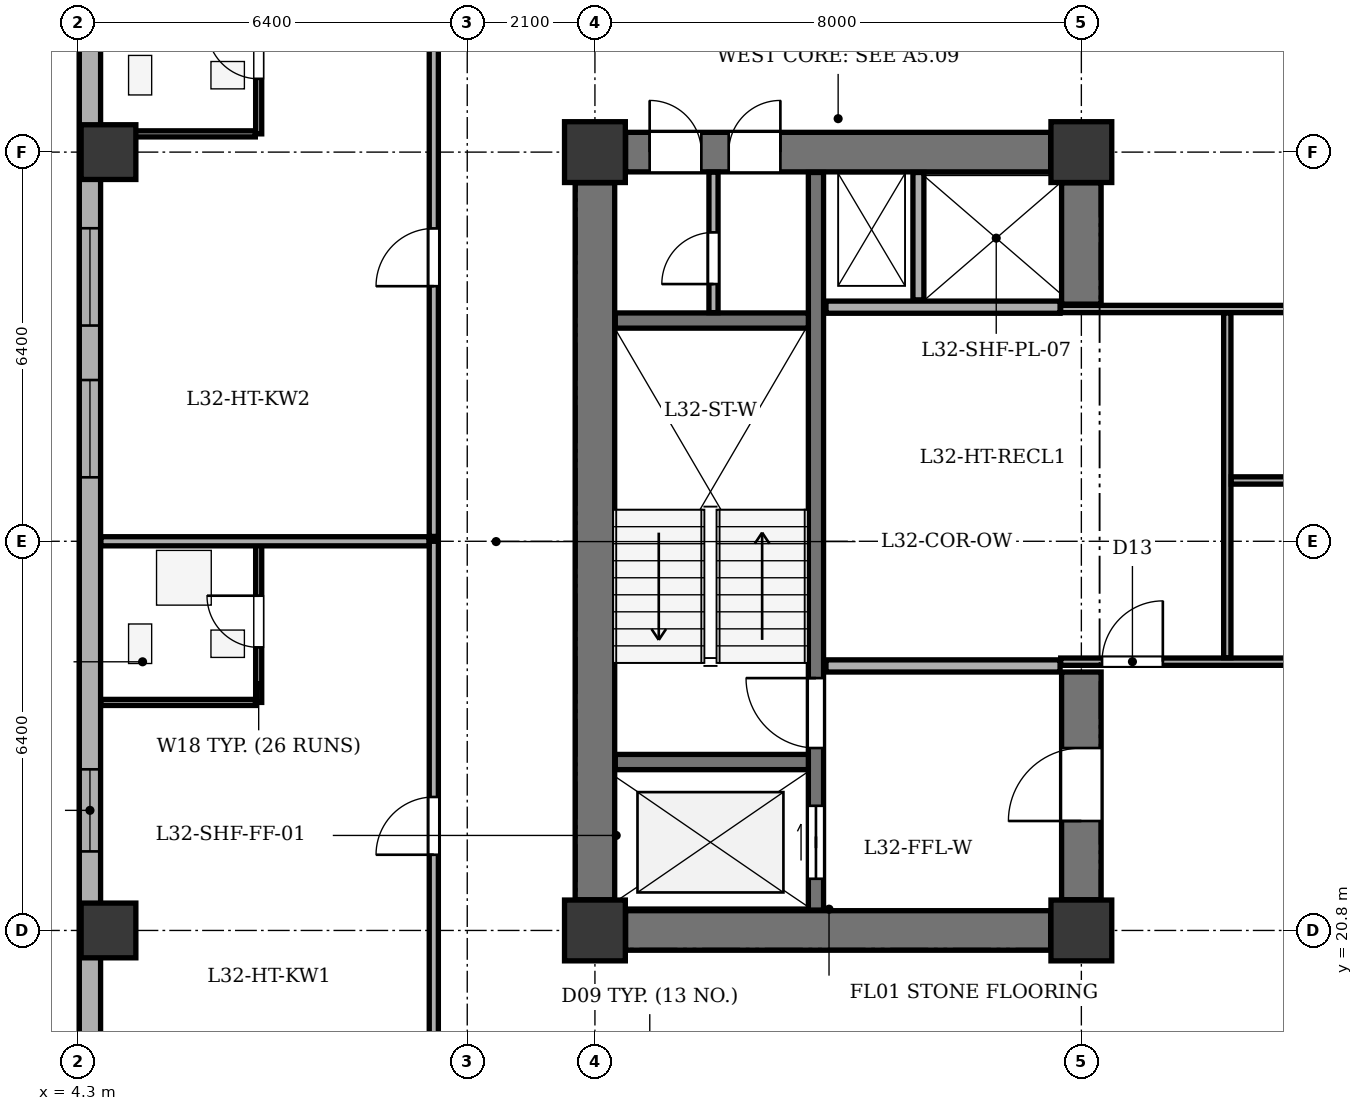
"""IFC4 building model, lengths in metres.
Left out: names, types, materials, properties, quantities, classifications, styles, units other than length and angle.
Written with IfcOpenShell. Run it as: python <this file> out.ifc"""

import sys

from ifc_helpers import new_model, si_unit, direction, frame, frame_2d, origin, origin_2d, place, context, subcontext, project, spatial, rectangle, extrude, element, fill, save


model = new_model("IFC4")
c1 = context("Model", 3, precision=1e-05, world=origin(), true_north=direction((0.0, 1.0)))
c2 = subcontext(c1, "Body", "Model", "MODEL_VIEW")
j1 = project(units=[si_unit("LENGTHUNIT", "METRE"), si_unit("PLANEANGLEUNIT", "RADIAN")], contexts=[c1])
p1 = place(None, origin())
s1 = spatial("IfcSite", under=j1, at=p1, CompositionType="ELEMENT")
p2 = place(p1, origin())
s2 = spatial("IfcBuilding", under=s1, at=p2, CompositionType="ELEMENT")
p3 = place(p2, frame((0.0, 0.0, 130.8)))
s3 = spatial("IfcBuildingStorey", under=s2, at=p3, CompositionType="ELEMENT", Elevation=130.8)
for number, where, z_axis, x_axis in (
    (1, (12.8, 20.8, 0.0), (0.0, 0.0, 1.0), (1.0, 0.0, 0.0)),
    (2, (20.8, 20.8, 0.0), (0.0, 0.0, 1.0), (1.0, 0.0, 0.0)),
    (3, (12.8, 33.6, 0.0), (0.0, 0.0, 1.0), (1.0, 0.0, 0.0)),
    (4, (20.8, 33.6, 0.0), (0.0, 0.0, 1.0), (1.0, 0.0, 0.0)),
):
    element("IfcColumn", number, at=place(p3, frame(where, z_axis=z_axis, x_axis=x_axis)), inside=s3, PredefinedType="COLUMN", context=c2, shape_type="SweptSolid", body=[
        extrude(rectangle(XDim=1.0, YDim=1.0, at=origin_2d()), origin(), (0.0, 0.0, 1.0), 3.5),
    ])
for number, where, z_axis, x_axis in (
    (5, (4.8, 20.8, 0.0), (0.0, 0.0, 1.0), (1.0, 0.0, 0.0)),
    (6, (4.8, 33.6, 0.0), (0.0, 0.0, 1.0), (1.0, 0.0, 0.0)),
):
    element("IfcColumn", number, at=place(p3, frame(where, z_axis=z_axis, x_axis=x_axis)), inside=s3, PredefinedType="COLUMN", context=c2, shape_type="SweptSolid", body=[
        extrude(rectangle(XDim=0.9, YDim=0.9, at=origin_2d()), origin(), (0.0, 0.0, 1.0), 3.5),
    ])
p4 = place(p3, frame((4.495, 6.5, 0.0), z_axis=(0.0, 0.0, 1.0), x_axis=(0.0, 1.0, 0.0)))
e7 = element("IfcWall", 7, at=p4, inside=s3, PredefinedType="STANDARD", context=c2, shape_type="SweptSolid", body=[
    extrude(rectangle(XDim=35.0, YDim=0.35, at=frame_2d((17.5, 0.0))), origin(), (0.0, 0.0, 1.0), 2.785),
])
p5 = place(p4, frame((2.595, 0.0, 0.75)))
e8 = element("IfcOpeningElement", 8, at=p5, cuts=e7, PredefinedType="OPENING", context=c2, shape_type="SweptSolid", body=[
    extrude(rectangle(XDim=1.6, YDim=1.75, at=frame_2d((0.8, 0.875))), frame((0.0, 0.185, 0.0), z_axis=(0.0, -1.0, 0.0), x_axis=(1.0, 0.0, 0.0)), (0.0, 0.0, 1.0), 0.37),
])
p6 = place(p4, frame((7.181, 0.0, 0.75)))
e9 = element("IfcOpeningElement", 9, at=p6, cuts=e7, PredefinedType="OPENING", context=c2, shape_type="SweptSolid", body=[
    extrude(rectangle(XDim=2.1, YDim=1.75, at=frame_2d((1.05, 0.875))), frame((0.0, 0.185, 0.0), z_axis=(0.0, -1.0, 0.0), x_axis=(1.0, 0.0, 0.0)), (0.0, 0.0, 1.0), 0.37),
])
p7 = place(p4, frame((15.6, 0.0, 0.75)))
e10 = element("IfcOpeningElement", 10, at=p7, cuts=e7, PredefinedType="OPENING", context=c2, shape_type="SweptSolid", body=[
    extrude(rectangle(XDim=1.35, YDim=1.75, at=frame_2d((0.675, 0.875))), frame((0.0, 0.185, 0.0), z_axis=(0.0, -1.0, 0.0), x_axis=(1.0, 0.0, 0.0)), (0.0, 0.0, 1.0), 0.37),
])
p8 = place(p4, frame((21.752, 0.0, 0.75)))
e11 = element("IfcOpeningElement", 11, at=p8, cuts=e7, PredefinedType="OPENING", context=c2, shape_type="SweptSolid", body=[
    extrude(rectangle(XDim=1.6, YDim=1.75, at=frame_2d((0.8, 0.875))), frame((0.0, 0.185, 0.0), z_axis=(0.0, -1.0, 0.0), x_axis=(1.0, 0.0, 0.0)), (0.0, 0.0, 1.0), 0.37),
])
p9 = place(p4, frame((24.248, 0.0, 0.75)))
e12 = element("IfcOpeningElement", 12, at=p9, cuts=e7, PredefinedType="OPENING", context=c2, shape_type="SweptSolid", body=[
    extrude(rectangle(XDim=1.6, YDim=1.75, at=frame_2d((0.8, 0.875))), frame((0.0, 0.185, 0.0), z_axis=(0.0, -1.0, 0.0), x_axis=(1.0, 0.0, 0.0)), (0.0, 0.0, 1.0), 0.37),
])
p10 = place(p4, frame((31.588, 0.0, 0.75)))
e13 = element("IfcOpeningElement", 13, at=p10, cuts=e7, PredefinedType="OPENING", context=c2, shape_type="SweptSolid", body=[
    extrude(rectangle(XDim=1.6, YDim=1.75, at=frame_2d((0.8, 0.875))), frame((0.0, 0.185, 0.0), z_axis=(0.0, -1.0, 0.0), x_axis=(1.0, 0.0, 0.0)), (0.0, 0.0, 1.0), 0.37),
])
p11 = place(p3, frame((12.8, 21.305, 0.0), z_axis=(0.0, 0.0, 1.0), x_axis=(0.0, 1.0, 0.0)))
e14 = element("IfcWall", 14, at=p11, inside=s3, PredefinedType="SHEAR", context=c2, shape_type="SweptSolid", body=[
    extrude(rectangle(XDim=11.79, YDim=0.65, at=frame_2d((5.895, 0.0))), origin(), (0.0, 0.0, 1.0), 3.2),
])
p12 = place(p3, frame((13.305, 20.8, 0.0), z_axis=(0.0, 0.0, 1.0), x_axis=(1.0, 0.0, 0.0)))
e15 = element("IfcWall", 15, at=p12, inside=s3, PredefinedType="SHEAR", context=c2, shape_type="SweptSolid", body=[
    extrude(rectangle(XDim=6.99, YDim=0.65, at=frame_2d((3.495, 0.0))), origin(), (0.0, 0.0, 1.0), 3.2),
])
p13 = place(p3, frame((13.305, 33.6, 0.0), z_axis=(0.0, 0.0, 1.0), x_axis=(1.0, 0.0, 0.0)))
e16 = element("IfcWall", 16, at=p13, inside=s3, PredefinedType="SHEAR", context=c2, shape_type="SweptSolid", body=[
    extrude(rectangle(XDim=6.99, YDim=0.65, at=frame_2d((3.495, 0.0))), origin(), (0.0, 0.0, 1.0), 3.2),
])
p14 = place(p13, frame((0.395, 0.0, 0.0)))
e17 = element("IfcOpeningElement", 17, at=p14, cuts=e16, PredefinedType="OPENING", context=c2, shape_type="SweptSolid", body=[
    extrude(rectangle(XDim=0.85, YDim=2.02, at=frame_2d((0.425, 1.01))), frame((0.0, 0.335, 0.0), z_axis=(0.0, -1.0, 0.0), x_axis=(1.0, 0.0, 0.0)), (0.0, 0.0, 1.0), 0.67),
])
p15 = place(p13, frame((1.695, 0.0, 0.0)))
e18 = element("IfcOpeningElement", 18, at=p15, cuts=e16, PredefinedType="OPENING", context=c2, shape_type="SweptSolid", body=[
    extrude(rectangle(XDim=0.85, YDim=2.02, at=frame_2d((0.425, 1.01))), frame((0.0, 0.335, 0.0), z_axis=(0.0, -1.0, 0.0), x_axis=(1.0, 0.0, 0.0)), (0.0, 0.0, 1.0), 0.67),
])
p16 = place(p3, frame((20.8, 21.305, 0.0), z_axis=(0.0, 0.0, 1.0), x_axis=(0.0, 1.0, 0.0)))
e19 = element("IfcWall", 19, at=p16, inside=s3, PredefinedType="SHEAR", context=c2, shape_type="SweptSolid", body=[
    extrude(rectangle(XDim=3.745, YDim=0.65, at=frame_2d((1.873, 0.0))), origin(), (0.0, 0.0, 1.0), 3.2),
])
p17 = place(p16, frame((1.295, 0.0, 0.0)))
e20 = element("IfcOpeningElement", 20, at=p17, cuts=e19, PredefinedType="OPENING", context=c2, shape_type="SweptSolid", body=[
    extrude(rectangle(XDim=1.2, YDim=2.15, at=frame_2d((0.6, 1.075))), frame((0.0, 0.335, 0.0), z_axis=(0.0, -1.0, 0.0), x_axis=(1.0, 0.0, 0.0)), (0.0, 0.0, 1.0), 0.67),
])
p18 = place(p3, frame((20.8, 31.1, 0.0), z_axis=(0.0, 0.0, 1.0), x_axis=(0.0, 1.0, 0.0)))
e21 = element("IfcWall", 21, at=p18, inside=s3, PredefinedType="SHEAR", context=c2, shape_type="SweptSolid", body=[
    extrude(rectangle(XDim=1.995, YDim=0.65, at=frame_2d((0.998, 0.0))), origin(), (0.0, 0.0, 1.0), 3.2),
])
p19 = place(p3, frame((16.435, 21.135, 0.0), z_axis=(0.0, 0.0, 1.0), x_axis=(0.0, 1.0, 0.0)))
e22 = element("IfcWall", 22, at=p19, inside=s3, PredefinedType="SHEAR", context=c2, shape_type="SweptSolid", body=[
    extrude(rectangle(XDim=12.13, YDim=0.25, at=frame_2d((6.065, 0.0))), origin(), (0.0, 0.0, 1.0), 3.2),
])
p20 = place(p19, frame((0.515, 0.0, 0.0)))
e23 = element("IfcOpeningElement", 23, at=p20, cuts=e22, PredefinedType="OPENING", context=c2, shape_type="SweptSolid", body=[
    extrude(rectangle(XDim=1.2, YDim=2.15, at=frame_2d((0.6, 1.075))), frame((0.0, 0.135, 0.0), z_axis=(0.0, -1.0, 0.0), x_axis=(1.0, 0.0, 0.0)), (0.0, 0.0, 1.0), 0.27),
])
p21 = place(p19, frame((2.665, 0.0, 0.0)))
e24 = element("IfcOpeningElement", 24, at=p21, cuts=e22, PredefinedType="OPENING", context=c2, shape_type="SweptSolid", body=[
    extrude(rectangle(XDim=1.15, YDim=2.15, at=frame_2d((0.575, 1.075))), frame((0.0, 0.135, 0.0), z_axis=(0.0, -1.0, 0.0), x_axis=(1.0, 0.0, 0.0)), (0.0, 0.0, 1.0), 0.27),
])
for number, where, z_axis, x_axis in (
    (25, (13.135, 23.57, 0.0), (0.0, 0.0, 1.0), (1.0, 0.0, 0.0)),
    (26, (13.135, 30.83, 0.0), (0.0, 0.0, 1.0), (1.0, 0.0, 0.0)),
):
    element("IfcWall", number, at=place(p3, frame(where, z_axis=z_axis, x_axis=x_axis)), inside=s3, PredefinedType="SHEAR", context=c2, shape_type="SweptSolid", body=[
        extrude(rectangle(XDim=3.175, YDim=0.25, at=frame_2d((1.587, 0.0))), origin(), (0.0, 0.0, 1.0), 3.2),
    ])
for number, where, z_axis, x_axis in (
    (27, (16.6, 25.15, 0.0), (0.0, 0.0, 1.0), (1.0, 0.0, 0.0)),
    (28, (16.6, 31.05, 0.0), (0.0, 0.0, 1.0), (1.0, 0.0, 0.0)),
):
    element("IfcWall", number, at=place(p3, frame(where, z_axis=z_axis, x_axis=x_axis)), inside=s3, PredefinedType="SOLIDWALL", context=c2, shape_type="SweptSolid", body=[
        extrude(rectangle(XDim=3.85, YDim=0.2, at=frame_2d((1.925, 0.0))), origin(), (0.0, 0.0, 1.0), 3.2),
    ])
p22 = place(p3, frame((18.12, 31.17, 0.0), z_axis=(0.0, 0.0, 1.0), x_axis=(0.0, 1.0, 0.0)))
e29 = element("IfcWall", 29, at=p22, inside=s3, PredefinedType="PARTITIONING", context=c2, shape_type="SweptSolid", body=[
    extrude(rectangle(XDim=2.095, YDim=0.18, at=frame_2d((1.047, 0.0))), origin(), (0.0, 0.0, 1.0), 3.2),
])
p23 = place(p3, frame((14.75, 30.96, 0.0), z_axis=(0.0, 0.0, 1.0), x_axis=(0.0, 1.0, 0.0)))
e30 = element("IfcWall", 30, at=p23, inside=s3, PredefinedType="PARTITIONING", context=c2, shape_type="SweptSolid", body=[
    extrude(rectangle(XDim=2.31, YDim=0.15, at=frame_2d((1.155, 0.0))), origin(), (0.0, 0.0, 1.0), 3.2),
])
p24 = place(p23, frame((0.47, 0.0, 0.0)))
e31 = element("IfcOpeningElement", 31, at=p24, cuts=e30, PredefinedType="OPENING", context=c2, shape_type="SweptSolid", body=[
    extrude(rectangle(XDim=0.85, YDim=2.02, at=frame_2d((0.425, 1.01))), frame((0.0, 0.085, 0.0), z_axis=(0.0, -1.0, 0.0), x_axis=(1.0, 0.0, 0.0)), (0.0, 0.0, 1.0), 0.17),
])
p25 = place(p3, frame((20.46, 25.22, 0.0), z_axis=(0.0, 0.0, 1.0), x_axis=(1.0, 0.0, 0.0)))
e32 = element("IfcWall", 32, at=p25, inside=s3, PredefinedType="PARTITIONING", context=c2, shape_type="SweptSolid", body=[
    extrude(rectangle(XDim=11.94, YDim=0.12, at=frame_2d((5.97, 0.0))), origin(), (0.0, 0.0, 1.0), 3.2),
])
p26 = place(p25, frame((0.68, 0.0, 0.0)))
e33 = element("IfcOpeningElement", 33, at=p26, cuts=e32, PredefinedType="OPENING", context=c2, shape_type="SweptSolid", body=[
    extrude(rectangle(XDim=1.0, YDim=2.1, at=frame_2d((0.5, 1.05))), frame((0.0, 0.07, 0.0), z_axis=(0.0, -1.0, 0.0), x_axis=(1.0, 0.0, 0.0)), (0.0, 0.0, 1.0), 0.14),
])
p27 = place(p3, frame((20.46, 31.02, 0.0), z_axis=(0.0, 0.0, 1.0), x_axis=(1.0, 0.0, 0.0)))
e34 = element("IfcWall", 34, at=p27, inside=s3, PredefinedType="PARTITIONING", context=c2, shape_type="SweptSolid", body=[
    extrude(rectangle(XDim=11.94, YDim=0.12, at=frame_2d((5.97, 0.0))), origin(), (0.0, 0.0, 1.0), 3.2),
])
p28 = place(p3, frame((23.2, 25.285, 0.0), z_axis=(0.0, 0.0, 1.0), x_axis=(0.0, 1.0, 0.0)))
e35 = element("IfcWall", 35, at=p28, inside=s3, PredefinedType="PARTITIONING", context=c2, shape_type="SweptSolid", body=[
    extrude(rectangle(XDim=5.67, YDim=0.12, at=frame_2d((2.835, 0.0))), origin(), (0.0, 0.0, 1.0), 3.2),
])
p29 = place(p3, frame((23.265, 28.2, 0.0), z_axis=(0.0, 0.0, 1.0), x_axis=(1.0, 0.0, 0.0)))
e36 = element("IfcWall", 36, at=p29, inside=s3, PredefinedType="PARTITIONING", context=c2, shape_type="SweptSolid", body=[
    extrude(rectangle(XDim=9.07, YDim=0.12, at=frame_2d((4.535, 0.0))), origin(), (0.0, 0.0, 1.0), 3.2),
])
p30 = place(p3, frame((10.15, 17.93, 0.0), z_axis=(0.0, 0.0, 1.0), x_axis=(0.0, 1.0, 0.0)))
e37 = element("IfcWall", 37, at=p30, inside=s3, PredefinedType="PARTITIONING", context=c2, shape_type="SweptSolid", body=[
    extrude(rectangle(XDim=9.27, YDim=0.15, at=frame_2d((4.635, 0.0))), origin(), (0.0, 0.0, 1.0), 3.2),
])
p31 = place(p30, frame((4.115, 0.0, 0.0)))
e38 = element("IfcOpeningElement", 38, at=p31, cuts=e37, PredefinedType="OPENING", context=c2, shape_type="SweptSolid", body=[
    extrude(rectangle(XDim=0.95, YDim=2.1, at=frame_2d((0.475, 1.05))), frame((0.0, 0.085, 0.0), z_axis=(0.0, -1.0, 0.0), x_axis=(1.0, 0.0, 0.0)), (0.0, 0.0, 1.0), 0.17),
])
p32 = place(p3, frame((7.27, 24.55, 0.0), z_axis=(0.0, 0.0, 1.0), x_axis=(0.0, 1.0, 0.0)))
e39 = element("IfcWall", 39, at=p32, inside=s3, PredefinedType="PARTITIONING", context=c2, shape_type="SweptSolid", body=[
    extrude(rectangle(XDim=2.65, YDim=0.1, at=frame_2d((1.325, 0.0))), origin(), (0.0, 0.0, 1.0), 3.2),
])
p33 = place(p32, frame((0.905, 0.0, 0.0)))
e40 = element("IfcOpeningElement", 40, at=p33, cuts=e39, PredefinedType="OPENING", context=c2, shape_type="SweptSolid", body=[
    extrude(rectangle(XDim=0.85, YDim=2.05, at=frame_2d((0.425, 1.025))), frame((0.0, 0.06, 0.0), z_axis=(0.0, -1.0, 0.0), x_axis=(1.0, 0.0, 0.0)), (0.0, 0.0, 1.0), 0.12),
])
p34 = place(p3, frame((4.675, 24.55, 0.0), z_axis=(0.0, 0.0, 1.0), x_axis=(1.0, 0.0, 0.0)))
e41 = element("IfcWall", 41, at=p34, inside=s3, PredefinedType="PARTITIONING", context=c2, shape_type="SweptSolid", body=[
    extrude(rectangle(XDim=2.54, YDim=0.1, at=frame_2d((1.27, 0.0))), origin(), (0.0, 0.0, 1.0), 3.2),
])
p35 = place(p3, frame((4.675, 27.2, 0.0), z_axis=(0.0, 0.0, 1.0), x_axis=(1.0, 0.0, 0.0)))
e42 = element("IfcWall", 42, at=p35, inside=s3, PredefinedType="PARTITIONING", context=c2, shape_type="SweptSolid", body=[
    extrude(rectangle(XDim=5.395, YDim=0.15, at=frame_2d((2.698, 0.0))), origin(), (0.0, 0.0, 1.0), 3.2),
])
p36 = place(p3, frame((10.15, 27.28, 0.0), z_axis=(0.0, 0.0, 1.0), x_axis=(0.0, 1.0, 0.0)))
e43 = element("IfcWall", 43, at=p36, inside=s3, PredefinedType="PARTITIONING", context=c2, shape_type="SweptSolid", body=[
    extrude(rectangle(XDim=9.19, YDim=0.15, at=frame_2d((4.595, 0.0))), origin(), (0.0, 0.0, 1.0), 3.2),
])
p37 = place(p36, frame((4.115, 0.0, 0.0)))
e44 = element("IfcOpeningElement", 44, at=p37, cuts=e43, PredefinedType="OPENING", context=c2, shape_type="SweptSolid", body=[
    extrude(rectangle(XDim=0.95, YDim=2.1, at=frame_2d((0.475, 1.05))), frame((0.0, 0.085, 0.0), z_axis=(0.0, -1.0, 0.0), x_axis=(1.0, 0.0, 0.0)), (0.0, 0.0, 1.0), 0.17),
])
p38 = place(p3, frame((7.27, 33.9, 0.0), z_axis=(0.0, 0.0, 1.0), x_axis=(0.0, 1.0, 0.0)))
e45 = element("IfcWall", 45, at=p38, inside=s3, PredefinedType="PARTITIONING", context=c2, shape_type="SweptSolid", body=[
    extrude(rectangle(XDim=2.57, YDim=0.1, at=frame_2d((1.285, 0.0))), origin(), (0.0, 0.0, 1.0), 3.2),
])
p39 = place(p38, frame((0.905, 0.0, 0.0)))
e46 = element("IfcOpeningElement", 46, at=p39, cuts=e45, PredefinedType="OPENING", context=c2, shape_type="SweptSolid", body=[
    extrude(rectangle(XDim=0.85, YDim=2.05, at=frame_2d((0.425, 1.025))), frame((0.0, 0.06, 0.0), z_axis=(0.0, -1.0, 0.0), x_axis=(1.0, 0.0, 0.0)), (0.0, 0.0, 1.0), 0.12),
])
p40 = place(p3, frame((4.675, 33.9, 0.0), z_axis=(0.0, 0.0, 1.0), x_axis=(1.0, 0.0, 0.0)))
e47 = element("IfcWall", 47, at=p40, inside=s3, PredefinedType="PARTITIONING", context=c2, shape_type="SweptSolid", body=[
    extrude(rectangle(XDim=2.54, YDim=0.1, at=frame_2d((1.27, 0.0))), origin(), (0.0, 0.0, 1.0), 2.535),
])
p41 = place(p7, origin())
e48 = element("IfcWindow", 48, at=p41, inside=s3, PartitioningType="SINGLE_PANEL", PredefinedType="WINDOW", context=c2, shape_type="SweptSolid", body=[
    extrude(rectangle(XDim=1.35, YDim=1.75, at=frame_2d((0.675, 0.875))), frame((0.0, -0.01, 0.0), z_axis=(0.0, -1.0, 0.0), x_axis=(1.0, 0.0, 0.0)), (0.0, 0.0, 1.0), 0.06),
])
fill(e10, e48)
p42 = place(p8, origin())
e49 = element("IfcWindow", 49, at=p42, inside=s3, PartitioningType="SINGLE_PANEL", PredefinedType="WINDOW", context=c2, shape_type="SweptSolid", body=[
    extrude(rectangle(XDim=1.6, YDim=1.75, at=frame_2d((0.8, 0.875))), frame((0.0, -0.01, 0.0), z_axis=(0.0, -1.0, 0.0), x_axis=(1.0, 0.0, 0.0)), (0.0, 0.0, 1.0), 0.06),
])
fill(e11, e49)
p43 = place(p9, origin())
e50 = element("IfcWindow", 50, at=p43, inside=s3, PartitioningType="SINGLE_PANEL", PredefinedType="WINDOW", context=c2, shape_type="SweptSolid", body=[
    extrude(rectangle(XDim=1.6, YDim=1.75, at=frame_2d((0.8, 0.875))), frame((0.0, -0.01, 0.0), z_axis=(0.0, -1.0, 0.0), x_axis=(1.0, 0.0, 0.0)), (0.0, 0.0, 1.0), 0.06),
])
fill(e12, e50)
p44 = place(p14, origin())
e51 = element("IfcDoor", 51, at=p44, inside=s3, OperationType="SINGLE_SWING_LEFT", PredefinedType="DOOR", context=c2, shape_type="SweptSolid", body=[
    extrude(rectangle(XDim=0.85, YDim=2.02, at=frame_2d((0.425, 1.01))), frame((0.0, 0.025, 0.0), z_axis=(0.0, -1.0, 0.0), x_axis=(1.0, 0.0, 0.0)), (0.0, 0.0, 1.0), 0.05),
])
fill(e17, e51)
p45 = place(p15, origin())
e52 = element("IfcDoor", 52, at=p45, inside=s3, OperationType="SINGLE_SWING_RIGHT", PredefinedType="DOOR", context=c2, shape_type="SweptSolid", body=[
    extrude(rectangle(XDim=0.85, YDim=2.02, at=frame_2d((0.425, 1.01))), frame((0.0, 0.025, 0.0), z_axis=(0.0, -1.0, 0.0), x_axis=(1.0, 0.0, 0.0)), (0.0, 0.0, 1.0), 0.05),
])
fill(e18, e52)
p46 = place(p17, origin())
e53 = element("IfcDoor", 53, at=p46, inside=s3, OperationType="SINGLE_SWING_LEFT", PredefinedType="DOOR", context=c2, shape_type="SweptSolid", body=[
    extrude(rectangle(XDim=1.2, YDim=2.15, at=frame_2d((0.6, 1.075))), frame((0.0, 0.025, 0.0), z_axis=(0.0, -1.0, 0.0), x_axis=(1.0, 0.0, 0.0)), (0.0, 0.0, 1.0), 0.05),
])
fill(e20, e53)
p47 = place(p20, origin())
e54 = element("IfcDoor", 54, at=p47, inside=s3, OperationType="DOUBLE_DOOR_SLIDING", PredefinedType="DOOR", context=c2, shape_type="SweptSolid", body=[
    extrude(rectangle(XDim=1.2, YDim=2.15, at=frame_2d((0.6, 1.075))), frame((0.0, 0.025, 0.0), z_axis=(0.0, -1.0, 0.0), x_axis=(1.0, 0.0, 0.0)), (0.0, 0.0, 1.0), 0.05),
])
fill(e23, e54)
p48 = place(p21, origin())
e55 = element("IfcDoor", 55, at=p48, inside=s3, OperationType="SINGLE_SWING_RIGHT", PredefinedType="DOOR", context=c2, shape_type="SweptSolid", body=[
    extrude(rectangle(XDim=1.15, YDim=2.15, at=frame_2d((0.575, 1.075))), frame((0.0, 0.025, 0.0), z_axis=(0.0, -1.0, 0.0), x_axis=(1.0, 0.0, 0.0)), (0.0, 0.0, 1.0), 0.05),
])
fill(e24, e55)
p49 = place(p24, origin())
e56 = element("IfcDoor", 56, at=p49, inside=s3, OperationType="SINGLE_SWING_LEFT", PredefinedType="DOOR", context=c2, shape_type="SweptSolid", body=[
    extrude(rectangle(XDim=0.85, YDim=2.02, at=frame_2d((0.425, 1.01))), frame((0.0, 0.025, 0.0), z_axis=(0.0, -1.0, 0.0), x_axis=(1.0, 0.0, 0.0)), (0.0, 0.0, 1.0), 0.05),
])
fill(e31, e56)
p50 = place(p26, origin())
e57 = element("IfcDoor", 57, at=p50, inside=s3, OperationType="SINGLE_SWING_RIGHT", PredefinedType="DOOR", context=c2, shape_type="SweptSolid", body=[
    extrude(rectangle(XDim=1.0, YDim=2.1, at=frame_2d((0.5, 1.05))), frame((0.0, 0.025, 0.0), z_axis=(0.0, -1.0, 0.0), x_axis=(1.0, 0.0, 0.0)), (0.0, 0.0, 1.0), 0.05),
])
fill(e33, e57)
p51 = place(p33, origin())
e58 = element("IfcDoor", 58, at=p51, inside=s3, OperationType="SINGLE_SWING_RIGHT", PredefinedType="DOOR", context=c2, shape_type="SweptSolid", body=[
    extrude(rectangle(XDim=0.85, YDim=2.05, at=frame_2d((0.425, 1.025))), frame((0.0, 0.025, 0.0), z_axis=(0.0, -1.0, 0.0), x_axis=(1.0, 0.0, 0.0)), (0.0, 0.0, 1.0), 0.05),
])
fill(e40, e58)
p52 = place(p31, origin())
e59 = element("IfcDoor", 59, at=p52, inside=s3, OperationType="SINGLE_SWING_LEFT", PredefinedType="DOOR", context=c2, shape_type="SweptSolid", body=[
    extrude(rectangle(XDim=0.95, YDim=2.1, at=frame_2d((0.475, 1.05))), frame((0.0, 0.025, 0.0), z_axis=(0.0, -1.0, 0.0), x_axis=(1.0, 0.0, 0.0)), (0.0, 0.0, 1.0), 0.05),
])
fill(e38, e59)
p53 = place(p39, origin())
e60 = element("IfcDoor", 60, at=p53, inside=s3, OperationType="SINGLE_SWING_RIGHT", PredefinedType="DOOR", context=c2, shape_type="SweptSolid", body=[
    extrude(rectangle(XDim=0.85, YDim=2.05, at=frame_2d((0.425, 1.025))), frame((0.0, 0.025, 0.0), z_axis=(0.0, -1.0, 0.0), x_axis=(1.0, 0.0, 0.0)), (0.0, 0.0, 1.0), 0.05),
])
fill(e46, e60)
p54 = place(p37, origin())
e61 = element("IfcDoor", 61, at=p54, inside=s3, OperationType="SINGLE_SWING_LEFT", PredefinedType="DOOR", context=c2, shape_type="SweptSolid", body=[
    extrude(rectangle(XDim=0.95, YDim=2.1, at=frame_2d((0.475, 1.05))), frame((0.0, 0.025, 0.0), z_axis=(0.0, -1.0, 0.0), x_axis=(1.0, 0.0, 0.0)), (0.0, 0.0, 1.0), 0.05),
])
fill(e44, e61)
save(model, sys.argv[1])
